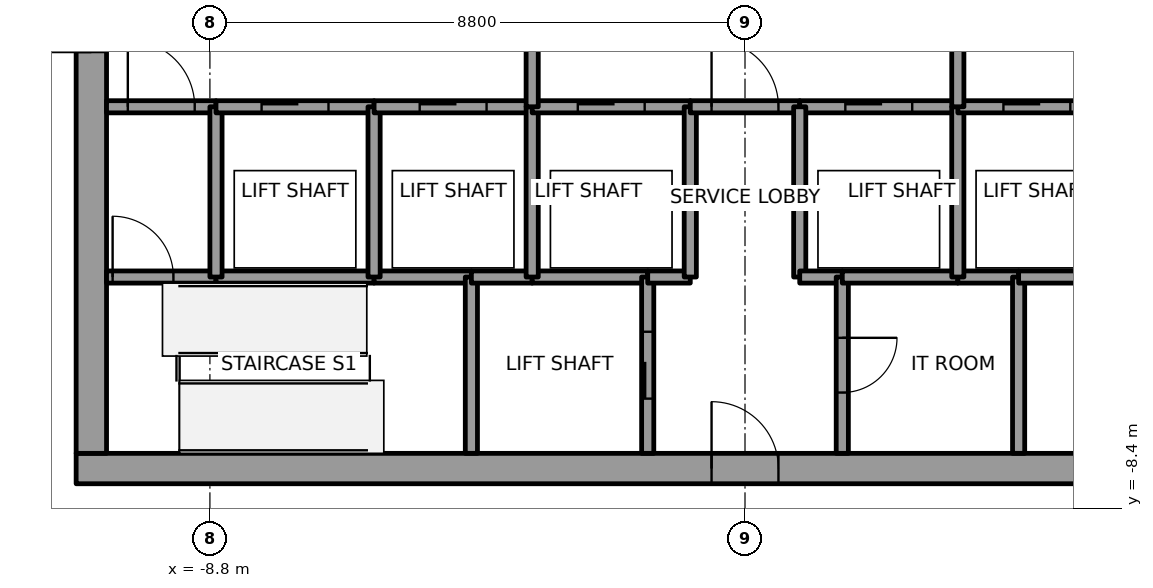
"""IFC4 building model, lengths in metres.
Left out: names, types, materials, properties, quantities, classifications, styles, units other than length and angle.
Written with IfcOpenShell. Run it as: python <this file> out.ifc"""

import sys

from ifc_helpers import new_model, si_unit, direction, frame, frame_2d, origin, place, context, subcontext, project, spatial, rectangle, extrude, element, fill, save


model = new_model("IFC4")
c1 = context("Model", 3, precision=1e-05, world=origin(), true_north=direction((0.0, 1.0)))
c2 = subcontext(c1, "Body", "Model", "MODEL_VIEW")
j1 = project(units=[si_unit("LENGTHUNIT", "METRE"), si_unit("PLANEANGLEUNIT", "RADIAN")], contexts=[c1])
p1 = place(None, origin())
s1 = spatial("IfcSite", under=j1, at=p1, CompositionType="ELEMENT")
p2 = place(p1, origin())
s2 = spatial("IfcBuilding", under=s1, at=p2, CompositionType="ELEMENT")
p3 = place(p2, frame((0.0, 0.0, 263.0)))
s3 = spatial("IfcBuildingStorey", under=s2, at=p3, CompositionType="ELEMENT", Elevation=263.0)
p4 = place(p3, frame((-11.0, -7.75, 0.0), z_axis=(0.0, 0.0, 1.0), x_axis=(1.0, 0.0, 0.0)))
e1 = element("IfcWall", 1, at=p4, inside=s3, PredefinedType="SHEAR", context=c2, shape_type="SweptSolid", body=[
    extrude(rectangle(XDim=22.0, YDim=0.5, at=frame_2d((11.0, 0.0))), origin(), (0.0, 0.0, 1.0), 4.0),
])
p5 = place(p4, frame((10.45, 0.0, 0.0)))
e2 = element("IfcOpeningElement", 2, at=p5, cuts=e1, PredefinedType="OPENING", context=c2, shape_type="SweptSolid", body=[
    extrude(rectangle(XDim=1.1, YDim=2.1, at=frame_2d((0.55, 1.05))), frame((0.0, 0.25, 0.0), z_axis=(0.0, -1.0, 0.0), x_axis=(1.0, 0.0, 0.0)), (0.0, 0.0, 1.0), 0.5),
])
p6 = place(p3, frame((-10.75, -7.5, 0.0), z_axis=(0.0, 0.0, 1.0), x_axis=(0.0, 1.0, 0.0)))
e3 = element("IfcWall", 3, at=p6, inside=s3, PredefinedType="SHEAR", context=c2, shape_type="SweptSolid", body=[
    extrude(rectangle(XDim=15.0, YDim=0.5, at=frame_2d((7.5, 0.0))), origin(), (0.0, 0.0, 1.0), 4.0),
])
p7 = place(p6, frame((6.6, 0.0, 0.0)))
e4 = element("IfcOpeningElement", 4, at=p7, cuts=e3, PredefinedType="OPENING", context=c2, shape_type="SweptSolid", body=[
    extrude(rectangle(XDim=1.8, YDim=2.1, at=frame_2d((0.9, 1.05))), frame((0.0, 0.25, 0.0), z_axis=(0.0, -1.0, 0.0), x_axis=(1.0, 0.0, 0.0)), (0.0, 0.0, 1.0), 0.5),
])
p8 = place(p3, frame((-10.5, -4.6, 0.0), z_axis=(0.0, 0.0, 1.0), x_axis=(1.0, 0.0, 0.0)))
e5 = element("IfcWall", 5, at=p8, inside=s3, PredefinedType="SOLIDWALL", context=c2, shape_type="SweptSolid", body=[
    extrude(rectangle(XDim=1.8, YDim=0.2, at=frame_2d((0.9, 0.0))), origin(), (0.0, 0.0, 1.0), 3.85),
])
p9 = place(p8, frame((0.1, 0.0, 0.0)))
e6 = element("IfcOpeningElement", 6, at=p9, cuts=e5, PredefinedType="OPENING", context=c2, shape_type="SweptSolid", body=[
    extrude(rectangle(XDim=1.0, YDim=2.1, at=frame_2d((0.5, 1.05))), frame((0.0, 0.1, 0.0), z_axis=(0.0, -1.0, 0.0), x_axis=(1.0, 0.0, 0.0)), (0.0, 0.0, 1.0), 0.2),
])
p10 = place(p3, frame((-10.5, -1.8, 0.0), z_axis=(0.0, 0.0, 1.0), x_axis=(1.0, 0.0, 0.0)))
e7 = element("IfcWall", 7, at=p10, inside=s3, PredefinedType="SOLIDWALL", context=c2, shape_type="SweptSolid", body=[
    extrude(rectangle(XDim=1.8, YDim=0.2, at=frame_2d((0.9, 0.0))), origin(), (0.0, 0.0, 1.0), 3.85),
])
p11 = place(p10, frame((0.35, 0.0, 0.0)))
e8 = element("IfcOpeningElement", 8, at=p11, cuts=e7, PredefinedType="OPENING", context=c2, shape_type="SweptSolid", body=[
    extrude(rectangle(XDim=1.1, YDim=2.1, at=frame_2d((0.55, 1.05))), frame((0.0, 0.1, 0.0), z_axis=(0.0, -1.0, 0.0), x_axis=(1.0, 0.0, 0.0)), (0.0, 0.0, 1.0), 0.2),
])
p12 = place(p3, frame((-8.7, -4.6, 0.0), z_axis=(0.0, 0.0, 1.0), x_axis=(1.0, 0.0, 0.0)))
e9 = element("IfcWall", 9, at=p12, inside=s3, PredefinedType="SOLIDWALL", context=c2, shape_type="SweptSolid", body=[
    extrude(rectangle(XDim=2.6, YDim=0.2, at=frame_2d((1.3, 0.0))), origin(), (0.0, 0.0, 1.0), 3.85),
])
p13 = place(p3, frame((-8.7, -4.6, 0.0), z_axis=(0.0, 0.0, 1.0), x_axis=(0.0, 1.0, 0.0)))
e10 = element("IfcWall", 10, at=p13, inside=s3, PredefinedType="SOLIDWALL", context=c2, shape_type="SweptSolid", body=[
    extrude(rectangle(XDim=2.8, YDim=0.2, at=frame_2d((1.4, 0.0))), origin(), (0.0, 0.0, 1.0), 3.85),
])
p14 = place(p3, frame((-8.7, -1.8, 0.0), z_axis=(0.0, 0.0, 1.0), x_axis=(1.0, 0.0, 0.0)))
e11 = element("IfcWall", 11, at=p14, inside=s3, PredefinedType="SOLIDWALL", context=c2, shape_type="SweptSolid", body=[
    extrude(rectangle(XDim=2.6, YDim=0.2, at=frame_2d((1.3, 0.0))), origin(), (0.0, 0.0, 1.0), 3.85),
])
p15 = place(p14, frame((0.75, 0.0, 0.0)))
e12 = element("IfcOpeningElement", 12, at=p15, cuts=e11, PredefinedType="OPENING", context=c2, shape_type="SweptSolid", body=[
    extrude(rectangle(XDim=1.1, YDim=2.1, at=frame_2d((0.55, 1.05))), frame((0.0, 0.1, 0.0), z_axis=(0.0, -1.0, 0.0), x_axis=(1.0, 0.0, 0.0)), (0.0, 0.0, 1.0), 0.2),
])
p16 = place(p3, frame((-6.1, -4.6, 0.0), z_axis=(0.0, 0.0, 1.0), x_axis=(1.0, 0.0, 0.0)))
e13 = element("IfcWall", 13, at=p16, inside=s3, PredefinedType="SOLIDWALL", context=c2, shape_type="SweptSolid", body=[
    extrude(rectangle(XDim=1.6, YDim=0.2, at=frame_2d((0.8, 0.0))), origin(), (0.0, 0.0, 1.0), 3.85),
])
p17 = place(p3, frame((-6.1, -4.6, 0.0), z_axis=(0.0, 0.0, 1.0), x_axis=(0.0, 1.0, 0.0)))
e14 = element("IfcWall", 14, at=p17, inside=s3, PredefinedType="SOLIDWALL", context=c2, shape_type="SweptSolid", body=[
    extrude(rectangle(XDim=2.8, YDim=0.2, at=frame_2d((1.4, 0.0))), origin(), (0.0, 0.0, 1.0), 3.85),
])
p18 = place(p3, frame((-6.1, -1.8, 0.0), z_axis=(0.0, 0.0, 1.0), x_axis=(1.0, 0.0, 0.0)))
e15 = element("IfcWall", 15, at=p18, inside=s3, PredefinedType="SOLIDWALL", context=c2, shape_type="SweptSolid", body=[
    extrude(rectangle(XDim=2.6, YDim=0.2, at=frame_2d((1.3, 0.0))), origin(), (0.0, 0.0, 1.0), 3.85),
])
p19 = place(p18, frame((0.75, 0.0, 0.0)))
e16 = element("IfcOpeningElement", 16, at=p19, cuts=e15, PredefinedType="OPENING", context=c2, shape_type="SweptSolid", body=[
    extrude(rectangle(XDim=1.1, YDim=2.1, at=frame_2d((0.55, 1.05))), frame((0.0, 0.1, 0.0), z_axis=(0.0, -1.0, 0.0), x_axis=(1.0, 0.0, 0.0)), (0.0, 0.0, 1.0), 0.2),
])
p20 = place(p3, frame((-4.5, -4.6, 0.0), z_axis=(0.0, 0.0, 1.0), x_axis=(0.0, -1.0, 0.0)))
e17 = element("IfcWall", 17, at=p20, inside=s3, PredefinedType="SOLIDWALL", context=c2, shape_type="SweptSolid", body=[
    extrude(rectangle(XDim=2.9, YDim=0.2, at=frame_2d((1.45, 0.0))), origin(), (0.0, 0.0, 1.0), 3.85),
])
p21 = place(p3, frame((-4.5, -4.6, 0.0), z_axis=(0.0, 0.0, 1.0), x_axis=(1.0, 0.0, 0.0)))
e18 = element("IfcWall", 18, at=p21, inside=s3, PredefinedType="SOLIDWALL", context=c2, shape_type="SweptSolid", body=[
    extrude(rectangle(XDim=1.0, YDim=0.2, at=frame_2d((0.5, 0.0))), origin(), (0.0, 0.0, 1.0), 3.85),
])
p22 = place(p3, frame((-3.5, -4.6, 0.0), z_axis=(0.0, 0.0, 1.0), x_axis=(1.0, 0.0, 0.0)))
e19 = element("IfcWall", 19, at=p22, inside=s3, PredefinedType="SOLIDWALL", context=c2, shape_type="SweptSolid", body=[
    extrude(rectangle(XDim=1.9, YDim=0.2, at=frame_2d((0.95, 0.0))), origin(), (0.0, 0.0, 1.0), 3.85),
])
p23 = place(p3, frame((-3.5, -4.6, 0.0), z_axis=(0.0, 0.0, 1.0), x_axis=(0.0, 1.0, 0.0)))
e20 = element("IfcWall", 20, at=p23, inside=s3, PredefinedType="SOLIDWALL", context=c2, shape_type="SweptSolid", body=[
    extrude(rectangle(XDim=2.8, YDim=0.2, at=frame_2d((1.4, 0.0))), origin(), (0.0, 0.0, 1.0), 3.85),
])
p24 = place(p3, frame((-3.5, -1.8, 0.0), z_axis=(0.0, 0.0, 1.0), x_axis=(1.0, 0.0, 0.0)))
e21 = element("IfcWall", 21, at=p24, inside=s3, PredefinedType="SOLIDWALL", context=c2, shape_type="SweptSolid", body=[
    extrude(rectangle(XDim=2.6, YDim=0.2, at=frame_2d((1.3, 0.0))), origin(), (0.0, 0.0, 1.0), 3.85),
])
p25 = place(p24, frame((0.75, 0.0, 0.0)))
e22 = element("IfcOpeningElement", 22, at=p25, cuts=e21, PredefinedType="OPENING", context=c2, shape_type="SweptSolid", body=[
    extrude(rectangle(XDim=1.1, YDim=2.1, at=frame_2d((0.55, 1.05))), frame((0.0, 0.1, 0.0), z_axis=(0.0, -1.0, 0.0), x_axis=(1.0, 0.0, 0.0)), (0.0, 0.0, 1.0), 0.2),
])
p26 = place(p3, frame((-3.5, 1.8, 0.0), z_axis=(0.0, 0.0, 1.0), x_axis=(0.0, -1.0, 0.0)))
e23 = element("IfcWall", 23, at=p26, inside=s3, PredefinedType="SOLIDWALL", context=c2, shape_type="SweptSolid", body=[
    extrude(rectangle(XDim=3.6, YDim=0.2, at=frame_2d((1.8, 0.0))), origin(), (0.0, 0.0, 1.0), 3.85),
])
p27 = place(p26, frame((1.05, 0.0, 0.0)))
e24 = element("IfcOpeningElement", 24, at=p27, cuts=e23, PredefinedType="OPENING", context=c2, shape_type="SweptSolid", body=[
    extrude(rectangle(XDim=1.5, YDim=2.1, at=frame_2d((0.75, 1.05))), frame((0.0, 0.1, 0.0), z_axis=(0.0, -1.0, 0.0), x_axis=(1.0, 0.0, 0.0)), (0.0, 0.0, 1.0), 0.2),
])
p28 = place(p3, frame((-1.6, -7.5, 0.0), z_axis=(0.0, 0.0, 1.0), x_axis=(0.0, 1.0, 0.0)))
e25 = element("IfcWall", 25, at=p28, inside=s3, PredefinedType="SOLIDWALL", context=c2, shape_type="SweptSolid", body=[
    extrude(rectangle(XDim=2.9, YDim=0.2, at=frame_2d((1.45, 0.0))), origin(), (0.0, 0.0, 1.0), 3.85),
])
p29 = place(p28, frame((0.9, 0.0, 0.0)))
e26 = element("IfcOpeningElement", 26, at=p29, cuts=e25, PredefinedType="OPENING", context=c2, shape_type="SweptSolid", body=[
    extrude(rectangle(XDim=1.1, YDim=2.1, at=frame_2d((0.55, 1.05))), frame((0.0, 0.1, 0.0), z_axis=(0.0, -1.0, 0.0), x_axis=(1.0, 0.0, 0.0)), (0.0, 0.0, 1.0), 0.2),
])
p30 = place(p3, frame((-1.6, -4.6, 0.0), z_axis=(0.0, 0.0, 1.0), x_axis=(1.0, 0.0, 0.0)))
e27 = element("IfcWall", 27, at=p30, inside=s3, PredefinedType="SOLIDWALL", context=c2, shape_type="SweptSolid", body=[
    extrude(rectangle(XDim=0.7, YDim=0.2, at=frame_2d((0.35, 0.0))), origin(), (0.0, 0.0, 1.0), 3.85),
])
p31 = place(p3, frame((-0.9, -4.6, 0.0), z_axis=(0.0, 0.0, 1.0), x_axis=(0.0, 1.0, 0.0)))
e28 = element("IfcWall", 28, at=p31, inside=s3, PredefinedType="SOLIDWALL", context=c2, shape_type="SweptSolid", body=[
    extrude(rectangle(XDim=2.8, YDim=0.2, at=frame_2d((1.4, 0.0))), origin(), (0.0, 0.0, 1.0), 3.85),
])
p32 = place(p3, frame((-0.9, -1.8, 0.0), z_axis=(0.0, 0.0, 1.0), x_axis=(1.0, 0.0, 0.0)))
e29 = element("IfcWall", 29, at=p32, inside=s3, PredefinedType="SOLIDWALL", context=c2, shape_type="SweptSolid", body=[
    extrude(rectangle(XDim=1.8, YDim=0.2, at=frame_2d((0.9, 0.0))), origin(), (0.0, 0.0, 1.0), 3.85),
])
p33 = place(p32, frame((0.35, 0.0, 0.0)))
e30 = element("IfcOpeningElement", 30, at=p33, cuts=e29, PredefinedType="OPENING", context=c2, shape_type="SweptSolid", body=[
    extrude(rectangle(XDim=1.1, YDim=2.1, at=frame_2d((0.55, 1.05))), frame((0.0, 0.1, 0.0), z_axis=(0.0, -1.0, 0.0), x_axis=(1.0, 0.0, 0.0)), (0.0, 0.0, 1.0), 0.2),
])
p34 = place(p3, frame((0.9, -1.8, 0.0), z_axis=(0.0, 0.0, 1.0), x_axis=(1.0, 0.0, 0.0)))
e31 = element("IfcWall", 31, at=p34, inside=s3, PredefinedType="SOLIDWALL", context=c2, shape_type="SweptSolid", body=[
    extrude(rectangle(XDim=2.6, YDim=0.2, at=frame_2d((1.3, 0.0))), origin(), (0.0, 0.0, 1.0), 3.85),
])
p35 = place(p34, frame((0.75, 0.0, 0.0)))
e32 = element("IfcOpeningElement", 32, at=p35, cuts=e31, PredefinedType="OPENING", context=c2, shape_type="SweptSolid", body=[
    extrude(rectangle(XDim=1.1, YDim=2.1, at=frame_2d((0.55, 1.05))), frame((0.0, 0.1, 0.0), z_axis=(0.0, -1.0, 0.0), x_axis=(1.0, 0.0, 0.0)), (0.0, 0.0, 1.0), 0.2),
])
p36 = place(p3, frame((0.9, -1.8, 0.0), z_axis=(0.0, 0.0, 1.0), x_axis=(0.0, -1.0, 0.0)))
e33 = element("IfcWall", 33, at=p36, inside=s3, PredefinedType="SOLIDWALL", context=c2, shape_type="SweptSolid", body=[
    extrude(rectangle(XDim=2.8, YDim=0.2, at=frame_2d((1.4, 0.0))), origin(), (0.0, 0.0, 1.0), 3.85),
])
p37 = place(p3, frame((0.9, -4.6, 0.0), z_axis=(0.0, 0.0, 1.0), x_axis=(1.0, 0.0, 0.0)))
e34 = element("IfcWall", 34, at=p37, inside=s3, PredefinedType="SOLIDWALL", context=c2, shape_type="SweptSolid", body=[
    extrude(rectangle(XDim=0.7, YDim=0.2, at=frame_2d((0.35, 0.0))), origin(), (0.0, 0.0, 1.0), 3.85),
])
p38 = place(p3, frame((1.6, -4.6, 0.0), z_axis=(0.0, 0.0, 1.0), x_axis=(0.0, -1.0, 0.0)))
e35 = element("IfcWall", 35, at=p38, inside=s3, PredefinedType="SOLIDWALL", context=c2, shape_type="SweptSolid", body=[
    extrude(rectangle(XDim=2.9, YDim=0.2, at=frame_2d((1.45, 0.0))), origin(), (0.0, 0.0, 1.0), 3.85),
])
p39 = place(p38, frame((1.0, 0.0, 0.0)))
e36 = element("IfcOpeningElement", 36, at=p39, cuts=e35, PredefinedType="OPENING", context=c2, shape_type="SweptSolid", body=[
    extrude(rectangle(XDim=0.9, YDim=2.1, at=frame_2d((0.45, 1.05))), frame((0.0, 0.1, 0.0), z_axis=(0.0, -1.0, 0.0), x_axis=(1.0, 0.0, 0.0)), (0.0, 0.0, 1.0), 0.2),
])
p40 = place(p3, frame((3.5, -4.6, 0.0), z_axis=(0.0, 0.0, 1.0), x_axis=(-1.0, 0.0, 0.0)))
e37 = element("IfcWall", 37, at=p40, inside=s3, PredefinedType="SOLIDWALL", context=c2, shape_type="SweptSolid", body=[
    extrude(rectangle(XDim=1.9, YDim=0.2, at=frame_2d((0.95, 0.0))), origin(), (0.0, 0.0, 1.0), 3.85),
])
p41 = place(p3, frame((4.5, -4.6, 0.0), z_axis=(0.0, 0.0, 1.0), x_axis=(-1.0, 0.0, 0.0)))
e38 = element("IfcWall", 38, at=p41, inside=s3, PredefinedType="SOLIDWALL", context=c2, shape_type="SweptSolid", body=[
    extrude(rectangle(XDim=1.0, YDim=0.2, at=frame_2d((0.5, 0.0))), origin(), (0.0, 0.0, 1.0), 3.85),
])
p42 = place(p3, frame((3.5, -4.6, 0.0), z_axis=(0.0, 0.0, 1.0), x_axis=(0.0, 1.0, 0.0)))
e39 = element("IfcWall", 39, at=p42, inside=s3, PredefinedType="SOLIDWALL", context=c2, shape_type="SweptSolid", body=[
    extrude(rectangle(XDim=2.8, YDim=0.2, at=frame_2d((1.4, 0.0))), origin(), (0.0, 0.0, 1.0), 3.85),
])
p43 = place(p3, frame((3.5, -1.8, 0.0), z_axis=(0.0, 0.0, 1.0), x_axis=(1.0, 0.0, 0.0)))
e40 = element("IfcWall", 40, at=p43, inside=s3, PredefinedType="SOLIDWALL", context=c2, shape_type="SweptSolid", body=[
    extrude(rectangle(XDim=2.6, YDim=0.2, at=frame_2d((1.3, 0.0))), origin(), (0.0, 0.0, 1.0), 3.85),
])
p44 = place(p43, frame((0.75, 0.0, 0.0)))
e41 = element("IfcOpeningElement", 41, at=p44, cuts=e40, PredefinedType="OPENING", context=c2, shape_type="SweptSolid", body=[
    extrude(rectangle(XDim=1.1, YDim=2.1, at=frame_2d((0.55, 1.05))), frame((0.0, 0.1, 0.0), z_axis=(0.0, -1.0, 0.0), x_axis=(1.0, 0.0, 0.0)), (0.0, 0.0, 1.0), 0.2),
])
p45 = place(p3, frame((3.5, -1.8, 0.0), z_axis=(0.0, 0.0, 1.0), x_axis=(0.0, 1.0, 0.0)))
e42 = element("IfcWall", 42, at=p45, inside=s3, PredefinedType="SOLIDWALL", context=c2, shape_type="SweptSolid", body=[
    extrude(rectangle(XDim=3.6, YDim=0.2, at=frame_2d((1.8, 0.0))), origin(), (0.0, 0.0, 1.0), 3.85),
])
p46 = place(p45, frame((1.05, 0.0, 0.0)))
e43 = element("IfcOpeningElement", 43, at=p46, cuts=e42, PredefinedType="OPENING", context=c2, shape_type="SweptSolid", body=[
    extrude(rectangle(XDim=1.5, YDim=2.1, at=frame_2d((0.75, 1.05))), frame((0.0, 0.1, 0.0), z_axis=(0.0, -1.0, 0.0), x_axis=(1.0, 0.0, 0.0)), (0.0, 0.0, 1.0), 0.2),
])
p47 = place(p3, frame((4.5, -4.6, 0.0), z_axis=(0.0, 0.0, 1.0), x_axis=(0.0, -1.0, 0.0)))
e44 = element("IfcWall", 44, at=p47, inside=s3, PredefinedType="SOLIDWALL", context=c2, shape_type="SweptSolid", body=[
    extrude(rectangle(XDim=2.9, YDim=0.2, at=frame_2d((1.45, 0.0))), origin(), (0.0, 0.0, 1.0), 3.85),
])
p48 = place(p3, frame((6.1, -4.6, 0.0), z_axis=(0.0, 0.0, 1.0), x_axis=(-1.0, 0.0, 0.0)))
e45 = element("IfcWall", 45, at=p48, inside=s3, PredefinedType="SOLIDWALL", context=c2, shape_type="SweptSolid", body=[
    extrude(rectangle(XDim=1.6, YDim=0.2, at=frame_2d((0.8, 0.0))), origin(), (0.0, 0.0, 1.0), 3.85),
])
p49 = place(p15, origin())
e46 = element("IfcDoor", 46, at=p49, inside=s3, OperationType="SLIDING_TO_RIGHT", PredefinedType="DOOR", context=c2, shape_type="SweptSolid", body=[
    extrude(rectangle(XDim=1.1, YDim=2.1, at=frame_2d((0.55, 1.05))), frame((0.0, 0.025, 0.0), z_axis=(0.0, -1.0, 0.0), x_axis=(1.0, 0.0, 0.0)), (0.0, 0.0, 1.0), 0.05),
])
fill(e12, e46)
p50 = place(p19, origin())
e47 = element("IfcDoor", 47, at=p50, inside=s3, OperationType="SLIDING_TO_RIGHT", PredefinedType="DOOR", context=c2, shape_type="SweptSolid", body=[
    extrude(rectangle(XDim=1.1, YDim=2.1, at=frame_2d((0.55, 1.05))), frame((0.0, 0.025, 0.0), z_axis=(0.0, -1.0, 0.0), x_axis=(1.0, 0.0, 0.0)), (0.0, 0.0, 1.0), 0.05),
])
fill(e16, e47)
p51 = place(p25, origin())
e48 = element("IfcDoor", 48, at=p51, inside=s3, OperationType="SLIDING_TO_LEFT", PredefinedType="DOOR", context=c2, shape_type="SweptSolid", body=[
    extrude(rectangle(XDim=1.1, YDim=2.1, at=frame_2d((0.55, 1.05))), frame((0.0, 0.025, 0.0), z_axis=(0.0, -1.0, 0.0), x_axis=(1.0, 0.0, 0.0)), (0.0, 0.0, 1.0), 0.05),
])
fill(e22, e48)
p52 = place(p35, origin())
e49 = element("IfcDoor", 49, at=p52, inside=s3, OperationType="SLIDING_TO_LEFT", PredefinedType="DOOR", context=c2, shape_type="SweptSolid", body=[
    extrude(rectangle(XDim=1.1, YDim=2.1, at=frame_2d((0.55, 1.05))), frame((0.0, 0.025, 0.0), z_axis=(0.0, -1.0, 0.0), x_axis=(1.0, 0.0, 0.0)), (0.0, 0.0, 1.0), 0.05),
])
fill(e32, e49)
p53 = place(p44, origin())
e50 = element("IfcDoor", 50, at=p53, inside=s3, OperationType="SLIDING_TO_RIGHT", PredefinedType="DOOR", context=c2, shape_type="SweptSolid", body=[
    extrude(rectangle(XDim=1.1, YDim=2.1, at=frame_2d((0.55, 1.05))), frame((0.0, 0.025, 0.0), z_axis=(0.0, -1.0, 0.0), x_axis=(1.0, 0.0, 0.0)), (0.0, 0.0, 1.0), 0.05),
])
fill(e41, e50)
p54 = place(p29, origin())
e51 = element("IfcDoor", 51, at=p54, inside=s3, OperationType="SLIDING_TO_RIGHT", PredefinedType="DOOR", context=c2, shape_type="SweptSolid", body=[
    extrude(rectangle(XDim=1.1, YDim=2.1, at=frame_2d((0.55, 1.05))), frame((0.0, 0.025, 0.0), z_axis=(0.0, -1.0, 0.0), x_axis=(1.0, 0.0, 0.0)), (0.0, 0.0, 1.0), 0.05),
])
fill(e26, e51)
p55 = place(p11, origin())
e52 = element("IfcDoor", 52, at=p55, inside=s3, OperationType="SINGLE_SWING_LEFT", PredefinedType="DOOR", context=c2, shape_type="SweptSolid", body=[
    extrude(rectangle(XDim=1.1, YDim=2.1, at=frame_2d((0.55, 1.05))), frame((0.0, 0.025, 0.0), z_axis=(0.0, -1.0, 0.0), x_axis=(1.0, 0.0, 0.0)), (0.0, 0.0, 1.0), 0.05),
])
fill(e8, e52)
p56 = place(p33, origin())
e53 = element("IfcDoor", 53, at=p56, inside=s3, OperationType="SINGLE_SWING_RIGHT", PredefinedType="DOOR", context=c2, shape_type="SweptSolid", body=[
    extrude(rectangle(XDim=1.1, YDim=2.1, at=frame_2d((0.55, 1.05))), frame((0.0, 0.025, 0.0), z_axis=(0.0, -1.0, 0.0), x_axis=(1.0, 0.0, 0.0)), (0.0, 0.0, 1.0), 0.05),
])
fill(e30, e53)
p57 = place(p9, origin())
e54 = element("IfcDoor", 54, at=p57, inside=s3, OperationType="SINGLE_SWING_LEFT", PredefinedType="DOOR", context=c2, shape_type="SweptSolid", body=[
    extrude(rectangle(XDim=1.0, YDim=2.1, at=frame_2d((0.5, 1.05))), frame((0.0, 0.025, 0.0), z_axis=(0.0, -1.0, 0.0), x_axis=(1.0, 0.0, 0.0)), (0.0, 0.0, 1.0), 0.05),
])
fill(e6, e54)
p58 = place(p39, origin())
e55 = element("IfcDoor", 55, at=p58, inside=s3, OperationType="SINGLE_SWING_RIGHT", PredefinedType="DOOR", context=c2, shape_type="SweptSolid", body=[
    extrude(rectangle(XDim=0.9, YDim=2.1, at=frame_2d((0.45, 1.05))), frame((0.0, 0.025, 0.0), z_axis=(0.0, -1.0, 0.0), x_axis=(1.0, 0.0, 0.0)), (0.0, 0.0, 1.0), 0.05),
])
fill(e36, e55)
p59 = place(p7, origin())
e56 = element("IfcDoor", 56, at=p59, inside=s3, OperationType="DOUBLE_DOOR_SINGLE_SWING", PredefinedType="DOOR", context=c2, shape_type="SweptSolid", body=[
    extrude(rectangle(XDim=1.8, YDim=2.1, at=frame_2d((0.9, 1.05))), frame((0.0, 0.025, 0.0), z_axis=(0.0, -1.0, 0.0), x_axis=(1.0, 0.0, 0.0)), (0.0, 0.0, 1.0), 0.05),
])
fill(e4, e56)
p60 = place(p5, origin())
e57 = element("IfcDoor", 57, at=p60, inside=s3, OperationType="SINGLE_SWING_RIGHT", PredefinedType="DOOR", context=c2, shape_type="SweptSolid", body=[
    extrude(rectangle(XDim=1.1, YDim=2.1, at=frame_2d((0.55, 1.05))), frame((0.0, 0.025, 0.0), z_axis=(0.0, -1.0, 0.0), x_axis=(1.0, 0.0, 0.0)), (0.0, 0.0, 1.0), 0.05),
])
fill(e2, e57)
save(model, sys.argv[1])
